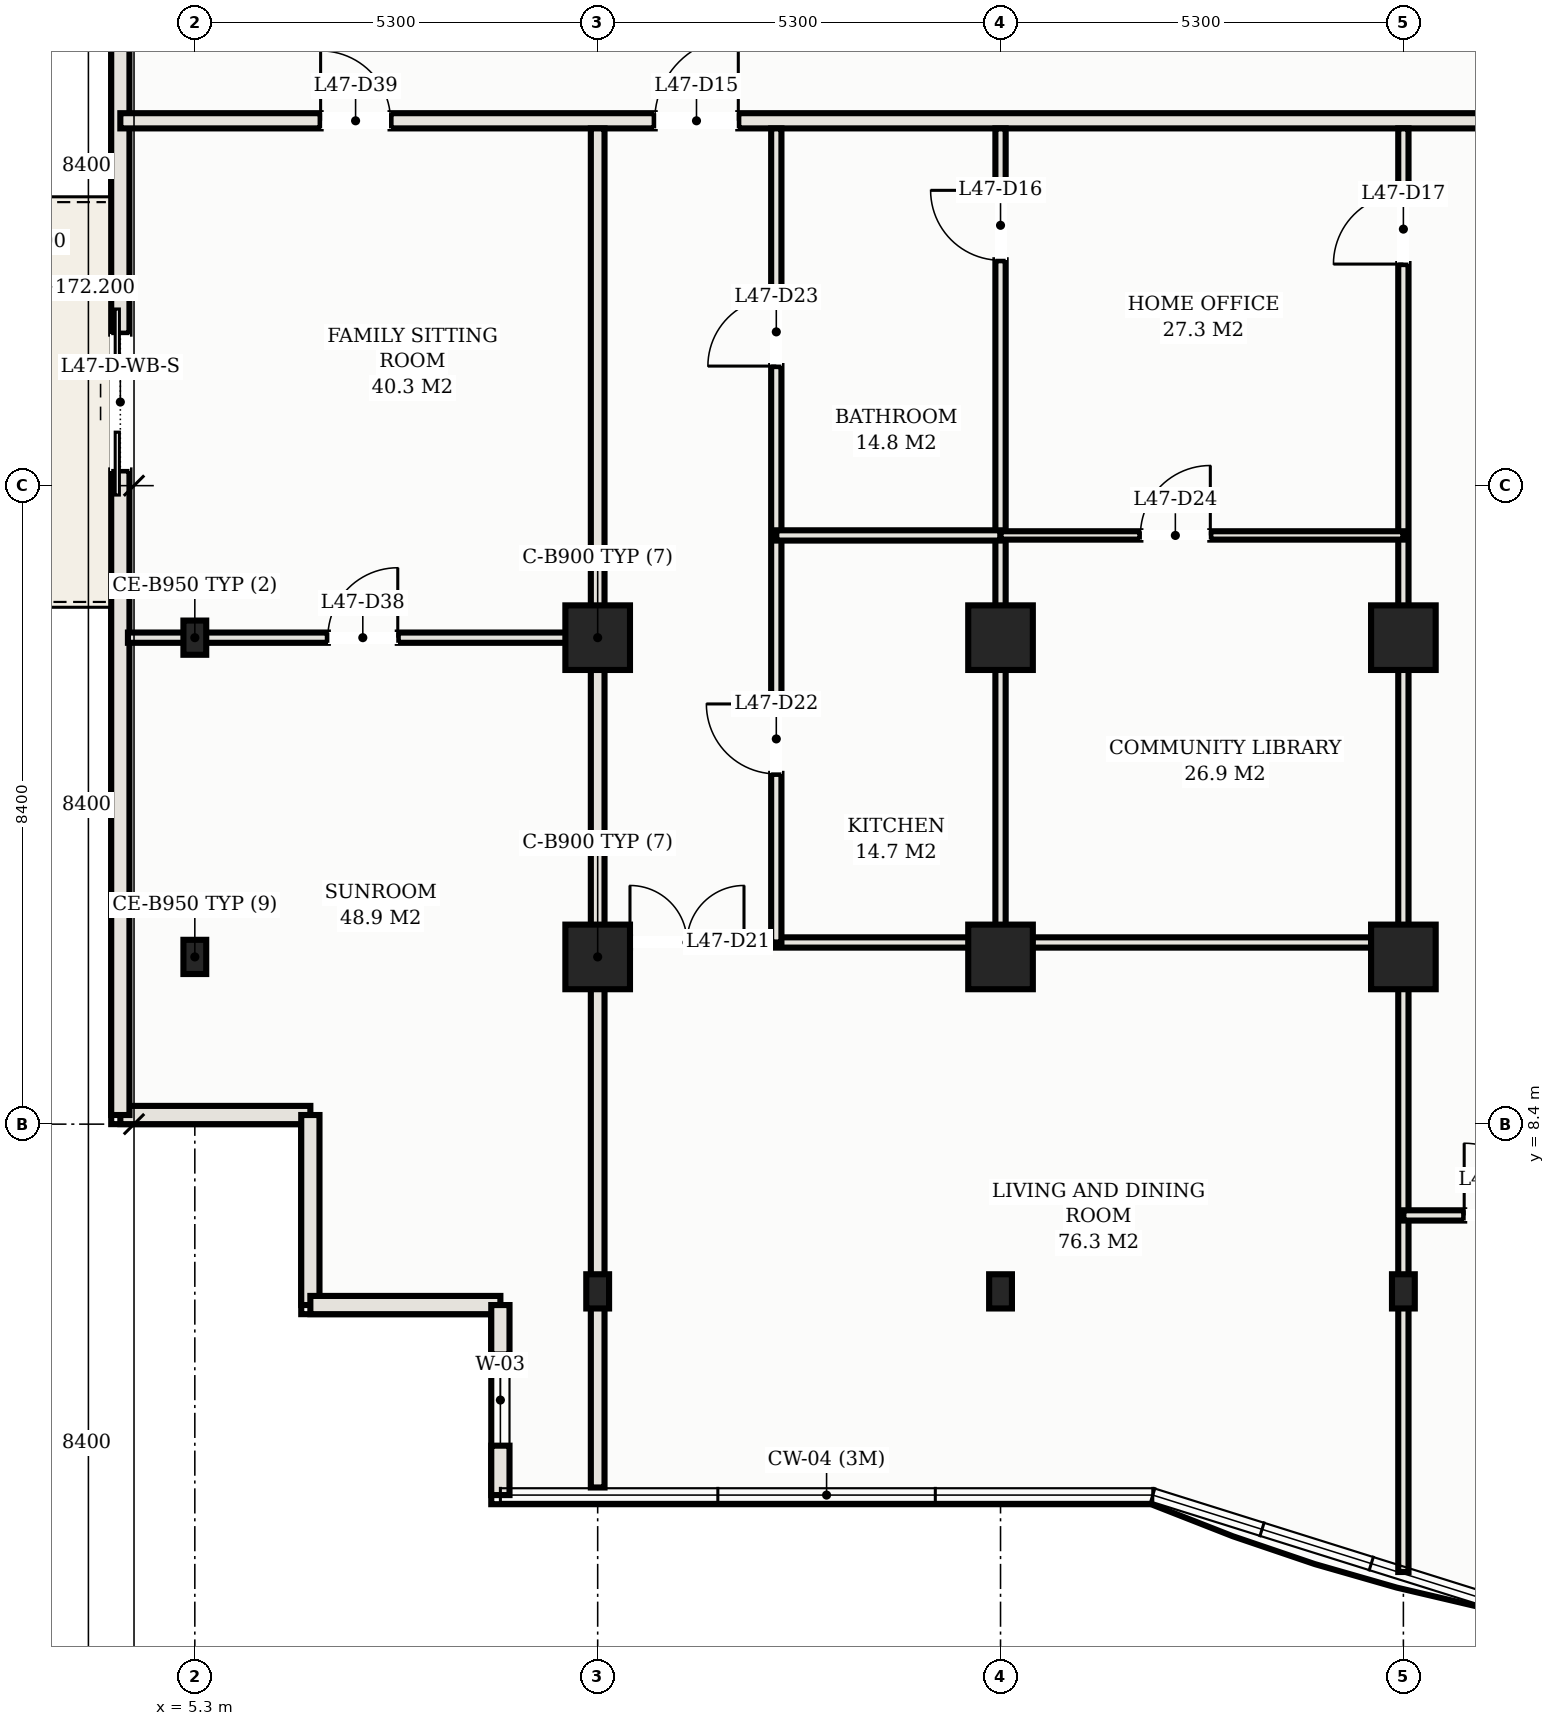
"""IFC4 building model, lengths in metres.
Left out: names, types, materials, properties, quantities, classifications, styles, units other than length and angle.
Written with IfcOpenShell. Run it as: python <this file> out.ifc"""

import sys

from ifc_helpers import new_model, si_unit, direction, frame, frame_2d, origin, origin_2d, place, context, subcontext, project, spatial, rectangle, hollow_rectangle, extrude, element, fill, save


model = new_model("IFC4")
c1 = context("Model", 3, precision=1e-05, world=origin(), true_north=direction((0.0, 1.0)))
c2 = subcontext(c1, "Body", "Model", "MODEL_VIEW")
j1 = project(units=[si_unit("LENGTHUNIT", "METRE"), si_unit("PLANEANGLEUNIT", "RADIAN")], contexts=[c1])
p1 = place(None, origin())
s1 = spatial("IfcSite", under=j1, at=p1, CompositionType="ELEMENT")
p2 = place(p1, origin())
s2 = spatial("IfcBuilding", under=s1, at=p2, CompositionType="ELEMENT")
p3 = place(p2, frame((0.0, 0.0, 172.2)))
s3 = spatial("IfcBuildingStorey", under=s2, at=p3, CompositionType="ELEMENT", Elevation=172.2)
for number, where, z_axis, x_axis in (
    (1, (10.6, 14.8, 0.0), (0.0, 0.0, 1.0), (1.0, 0.0, 0.0)),
    (2, (10.6, 10.6, 0.0), (0.0, 0.0, 1.0), (1.0, 0.0, 0.0)),
    (3, (15.9, 14.8, 0.0), (0.0, 0.0, 1.0), (1.0, 0.0, 0.0)),
    (4, (15.9, 10.6, 0.0), (0.0, 0.0, 1.0), (1.0, 0.0, 0.0)),
    (5, (21.2, 14.8, 0.0), (0.0, 0.0, 1.0), (1.0, 0.0, 0.0)),
    (6, (21.2, 10.6, 0.0), (0.0, 0.0, 1.0), (1.0, 0.0, 0.0)),
):
    element("IfcColumn", number, at=place(p3, frame(where, z_axis=z_axis, x_axis=x_axis)), inside=s3, PredefinedType="COLUMN", context=c2, shape_type="SweptSolid", body=[
        extrude(hollow_rectangle(XDim=0.85, YDim=0.85, WallThickness=0.028, at=origin_2d()), origin(), (0.0, 0.0, 1.0), 3.3),
    ])
for number, where, z_axis, x_axis in (
    (7, (10.6, 6.2, 0.0), (0.0, 0.0, 1.0), (1.0, 0.0, 0.0)),
    (8, (15.9, 6.2, 0.0), (0.0, 0.0, 1.0), (1.0, 0.0, 0.0)),
    (9, (21.2, 6.2, 0.0), (0.0, 0.0, 1.0), (1.0, 0.0, 0.0)),
    (10, (5.3, 10.6, 0.0), (0.0, 0.0, 1.0), (1.0, 0.0, 0.0)),
    (11, (5.3, 14.8, 0.0), (0.0, 0.0, 1.0), (1.0, 0.0, 0.0)),
):
    element("IfcColumn", number, at=place(p3, frame(where, z_axis=z_axis, x_axis=x_axis)), inside=s3, PredefinedType="COLUMN", context=c2, shape_type="SweptSolid", body=[
        extrude(hollow_rectangle(XDim=0.3, YDim=0.45, WallThickness=0.016, at=origin_2d()), origin(), (0.0, 0.0, 1.0), 3.3),
    ])
for number, where, z_axis, x_axis in (
    (12, (4.32, 8.52, 0.0), (0.0, 0.0, 1.0), (1.0, 0.0, 0.0)),
    (13, (6.82, 8.52, 0.0), (0.0, 0.0, 1.0), (0.0, -1.0, 0.0)),
    (14, (6.82, 6.02, 0.0), (0.0, 0.0, 1.0), (1.0, 0.0, 0.0)),
):
    element("IfcWall", number, at=place(p3, frame(where, z_axis=z_axis, x_axis=x_axis)), inside=s3, PredefinedType="SOLIDWALL", context=c2, shape_type="SweptSolid", body=[
        extrude(rectangle(XDim=2.5, YDim=0.24, at=frame_2d((1.25, 0.0))), origin(), (0.0, 0.0, 1.0), 3.1),
    ])
p4 = place(p3, frame((9.32, 6.02, 0.0), z_axis=(0.0, 0.0, 1.0), x_axis=(0.0, -1.0, 0.0)))
e15 = element("IfcWall", 15, at=p4, inside=s3, PredefinedType="SOLIDWALL", context=c2, shape_type="SweptSolid", body=[
    extrude(rectangle(XDim=2.5, YDim=0.24, at=frame_2d((1.25, 0.0))), origin(), (0.0, 0.0, 1.0), 3.1),
])
p5 = place(p4, frame((0.65, 0.0, 0.75)))
e16 = element("IfcOpeningElement", 16, at=p5, cuts=e15, PredefinedType="OPENING", context=c2, shape_type="SweptSolid", body=[
    extrude(rectangle(XDim=1.2, YDim=1.5, at=frame_2d((0.6, 0.75))), frame((0.0, 0.13, 0.0), z_axis=(0.0, -1.0, 0.0), x_axis=(1.0, 0.0, 0.0)), (0.0, 0.0, 1.0), 0.26),
])
p6 = place(p3, frame((4.32, 35.93, 0.0), z_axis=(0.0, 0.0, 1.0), x_axis=(0.0, -1.0, 0.0)))
e17 = element("IfcWall", 17, at=p6, inside=s3, PredefinedType="SOLIDWALL", context=c2, shape_type="SweptSolid", body=[
    extrude(rectangle(XDim=27.41, YDim=0.24, at=frame_2d((13.705, 0.0))), origin(), (0.0, 0.0, 1.0), 3.1),
])
p7 = place(p6, frame((17.13, 0.0, 0.0)))
e18 = element("IfcOpeningElement", 18, at=p7, cuts=e17, PredefinedType="OPENING", context=c2, shape_type="SweptSolid", body=[
    extrude(rectangle(XDim=1.8, YDim=2.2, at=frame_2d((0.9, 1.1))), frame((0.0, 0.13, 0.0), z_axis=(0.0, -1.0, 0.0), x_axis=(1.0, 0.0, 0.0)), (0.0, 0.0, 1.0), 0.26),
])
p8 = place(p3, frame((4.32, 21.6, 0.0), z_axis=(0.0, 0.0, 1.0), x_axis=(1.0, 0.0, 0.0)))
e19 = element("IfcWall", 19, at=p8, inside=s3, PredefinedType="PARTITIONING", context=c2, shape_type="SweptSolid", body=[
    extrude(rectangle(XDim=44.36, YDim=0.2, at=frame_2d((22.18, 0.0))), origin(), (0.0, 0.0, 1.0), 2.38),
])
p9 = place(p8, frame((7.03, 0.0, 0.0)))
e20 = element("IfcOpeningElement", 20, at=p9, cuts=e19, PredefinedType="OPENING", context=c2, shape_type="SweptSolid", body=[
    extrude(rectangle(XDim=1.1, YDim=2.25, at=frame_2d((0.55, 1.125))), frame((0.0, 0.11, 0.0), z_axis=(0.0, -1.0, 0.0), x_axis=(1.0, 0.0, 0.0)), (0.0, 0.0, 1.0), 0.22),
])
p10 = place(p8, frame((2.635, 0.0, 0.0)))
e21 = element("IfcOpeningElement", 21, at=p10, cuts=e19, PredefinedType="OPENING", context=c2, shape_type="SweptSolid", body=[
    extrude(rectangle(XDim=0.92, YDim=2.15, at=frame_2d((0.46, 1.075))), frame((0.0, 0.11, 0.0), z_axis=(0.0, -1.0, 0.0), x_axis=(1.0, 0.0, 0.0)), (0.0, 0.0, 1.0), 0.22),
])
p11 = place(p8, frame((40.805, 0.0, 0.0)))
e22 = element("IfcOpeningElement", 22, at=p11, cuts=e19, PredefinedType="OPENING", context=c2, shape_type="SweptSolid", body=[
    extrude(rectangle(XDim=0.92, YDim=2.15, at=frame_2d((0.46, 1.075))), frame((0.0, 0.11, 0.0), z_axis=(0.0, -1.0, 0.0), x_axis=(1.0, 0.0, 0.0)), (0.0, 0.0, 1.0), 0.22),
])
p12 = place(p3, frame((10.6, 3.62, 0.0), z_axis=(0.0, 0.0, 1.0), x_axis=(0.0, 1.0, 0.0)))
e23 = element("IfcWall", 23, at=p12, inside=s3, PredefinedType="PARTITIONING", context=c2, shape_type="SweptSolid", body=[
    extrude(rectangle(XDim=17.88, YDim=0.18, at=frame_2d((8.94, 0.0))), origin(), (0.0, 0.0, 1.0), 2.38),
])
p13 = place(p3, frame((15.9, 14.8, 0.0), z_axis=(0.0, 0.0, 1.0), x_axis=(0.0, 1.0, 0.0)))
e24 = element("IfcWall", 24, at=p13, inside=s3, PredefinedType="PARTITIONING", context=c2, shape_type="SweptSolid", body=[
    extrude(rectangle(XDim=6.7, YDim=0.135, at=frame_2d((3.35, 0.0))), origin(), (0.0, 0.0, 1.0), 2.38),
])
p14 = place(p13, frame((4.965, 0.0, 0.0)))
e25 = element("IfcOpeningElement", 25, at=p14, cuts=e24, PredefinedType="OPENING", context=c2, shape_type="SweptSolid", body=[
    extrude(rectangle(XDim=0.92, YDim=2.15, at=frame_2d((0.46, 1.075))), frame((0.0, 0.078, 0.0), z_axis=(0.0, -1.0, 0.0), x_axis=(1.0, 0.0, 0.0)), (0.0, 0.0, 1.0), 0.155),
])
p15 = place(p3, frame((21.2, 2.508, 0.0), z_axis=(0.0, 0.0, 1.0), x_axis=(0.0, 1.0, 0.0)))
e26 = element("IfcWall", 26, at=p15, inside=s3, PredefinedType="PARTITIONING", context=c2, shape_type="SweptSolid", body=[
    extrude(rectangle(XDim=18.992, YDim=0.135, at=frame_2d((9.496, 0.0))), origin(), (0.0, 0.0, 1.0), 2.38),
])
p16 = place(p15, frame((17.207, 0.0, 0.0)))
e27 = element("IfcOpeningElement", 27, at=p16, cuts=e26, PredefinedType="OPENING", context=c2, shape_type="SweptSolid", body=[
    extrude(rectangle(XDim=0.92, YDim=2.15, at=frame_2d((0.46, 1.075))), frame((0.0, 0.078, 0.0), z_axis=(0.0, -1.0, 0.0), x_axis=(1.0, 0.0, 0.0)), (0.0, 0.0, 1.0), 0.155),
])
p17 = place(p3, frame((15.9, 10.79, 0.0), z_axis=(0.0, 0.0, 1.0), x_axis=(0.0, 1.0, 0.0)))
e28 = element("IfcWall", 28, at=p17, inside=s3, PredefinedType="PARTITIONING", context=c2, shape_type="SweptSolid", body=[
    extrude(rectangle(XDim=4.01, YDim=0.135, at=frame_2d((2.005, 0.0))), origin(), (0.0, 0.0, 1.0), 2.38),
])
p18 = place(p3, frame((10.6, 10.79, 0.0), z_axis=(0.0, 0.0, 1.0), x_axis=(1.0, 0.0, 0.0)))
e29 = element("IfcWall", 29, at=p18, inside=s3, PredefinedType="PARTITIONING", context=c2, shape_type="SweptSolid", body=[
    extrude(rectangle(XDim=10.6, YDim=0.135, at=frame_2d((5.3, 0.0))), origin(), (0.0, 0.0, 1.0), 2.38),
])
p19 = place(p18, frame((0.425, 0.0, 0.0)))
e30 = element("IfcOpeningElement", 30, at=p19, cuts=e29, PredefinedType="OPENING", context=c2, shape_type="SweptSolid", body=[
    extrude(rectangle(XDim=1.5, YDim=2.25, at=frame_2d((0.75, 1.125))), frame((0.0, 0.078, 0.0), z_axis=(0.0, -1.0, 0.0), x_axis=(1.0, 0.0, 0.0)), (0.0, 0.0, 1.0), 0.155),
])
p20 = place(p3, frame((12.95, 10.79, 0.0), z_axis=(0.0, 0.0, 1.0), x_axis=(0.0, 1.0, 0.0)))
e31 = element("IfcWall", 31, at=p20, inside=s3, PredefinedType="PARTITIONING", context=c2, shape_type="SweptSolid", body=[
    extrude(rectangle(XDim=10.71, YDim=0.135, at=frame_2d((5.355, 0.0))), origin(), (0.0, 0.0, 1.0), 2.38),
])
p21 = place(p20, frame((2.218, 0.0, 0.0)))
e32 = element("IfcOpeningElement", 32, at=p21, cuts=e31, PredefinedType="OPENING", context=c2, shape_type="SweptSolid", body=[
    extrude(rectangle(XDim=0.92, YDim=2.15, at=frame_2d((0.46, 1.075))), frame((0.0, 0.078, 0.0), z_axis=(0.0, -1.0, 0.0), x_axis=(1.0, 0.0, 0.0)), (0.0, 0.0, 1.0), 0.155),
])
p22 = place(p20, frame((7.583, 0.0, 0.0)))
e33 = element("IfcOpeningElement", 33, at=p22, cuts=e31, PredefinedType="OPENING", context=c2, shape_type="SweptSolid", body=[
    extrude(rectangle(XDim=0.9, YDim=2.15, at=frame_2d((0.45, 1.075))), frame((0.0, 0.078, 0.0), z_axis=(0.0, -1.0, 0.0), x_axis=(1.0, 0.0, 0.0)), (0.0, 0.0, 1.0), 0.155),
])
p23 = place(p3, frame((12.95, 16.145, 0.0), z_axis=(0.0, 0.0, 1.0), x_axis=(1.0, 0.0, 0.0)))
e34 = element("IfcWall", 34, at=p23, inside=s3, PredefinedType="PARTITIONING", context=c2, shape_type="SweptSolid", body=[
    extrude(rectangle(XDim=2.95, YDim=0.135, at=frame_2d((1.475, 0.0))), origin(), (0.0, 0.0, 1.0), 2.38),
])
p24 = place(p3, frame((15.9, 16.145, 0.0), z_axis=(0.0, 0.0, 1.0), x_axis=(1.0, 0.0, 0.0)))
e35 = element("IfcWall", 35, at=p24, inside=s3, PredefinedType="MOVABLE", context=c2, shape_type="SweptSolid", body=[
    extrude(rectangle(XDim=5.3, YDim=0.11, at=frame_2d((2.65, 0.0))), origin(), (0.0, 0.0, 1.0), 2.38),
])
p25 = place(p24, frame((1.84, 0.0, 0.0)))
e36 = element("IfcOpeningElement", 36, at=p25, cuts=e35, PredefinedType="OPENING", context=c2, shape_type="SweptSolid", body=[
    extrude(rectangle(XDim=0.92, YDim=2.15, at=frame_2d((0.46, 1.075))), frame((0.0, 0.065, 0.0), z_axis=(0.0, -1.0, 0.0), x_axis=(1.0, 0.0, 0.0)), (0.0, 0.0, 1.0), 0.13),
])
p26 = place(p3, frame((21.2, 7.199, 0.0), z_axis=(0.0, 0.0, 1.0), x_axis=(1.0, 0.0, 0.0)))
e37 = element("IfcWall", 37, at=p26, inside=s3, PredefinedType="PARTITIONING", context=c2, shape_type="SweptSolid", body=[
    extrude(rectangle(XDim=5.3, YDim=0.135, at=frame_2d((2.65, 0.0))), origin(), (0.0, 0.0, 1.0), 2.38),
])
p27 = place(p26, frame((0.8, 0.0, 0.0)))
e38 = element("IfcOpeningElement", 38, at=p27, cuts=e37, PredefinedType="OPENING", context=c2, shape_type="SweptSolid", body=[
    extrude(rectangle(XDim=0.95, YDim=2.15, at=frame_2d((0.475, 1.075))), frame((0.0, 0.078, 0.0), z_axis=(0.0, -1.0, 0.0), x_axis=(1.0, 0.0, 0.0)), (0.0, 0.0, 1.0), 0.155),
])
p28 = place(p26, frame((3.075, 0.0, 0.0)))
e39 = element("IfcOpeningElement", 39, at=p28, cuts=e37, PredefinedType="OPENING", context=c2, shape_type="SweptSolid", body=[
    extrude(rectangle(XDim=0.9, YDim=2.15, at=frame_2d((0.45, 1.075))), frame((0.0, 0.078, 0.0), z_axis=(0.0, -1.0, 0.0), x_axis=(1.0, 0.0, 0.0)), (0.0, 0.0, 1.0), 0.155),
])
p29 = place(p3, frame((4.42, 14.8, 0.0), z_axis=(0.0, 0.0, 1.0), x_axis=(1.0, 0.0, 0.0)))
e40 = element("IfcWall", 40, at=p29, inside=s3, PredefinedType="PARTITIONING", context=c2, shape_type="SweptSolid", body=[
    extrude(rectangle(XDim=6.18, YDim=0.135, at=frame_2d((3.09, 0.0))), origin(), (0.0, 0.0, 1.0), 2.38),
])
p30 = place(p29, frame((2.63, 0.0, 0.0)))
e41 = element("IfcOpeningElement", 41, at=p30, cuts=e40, PredefinedType="OPENING", context=c2, shape_type="SweptSolid", body=[
    extrude(rectangle(XDim=0.92, YDim=2.15, at=frame_2d((0.46, 1.075))), frame((0.0, 0.078, 0.0), z_axis=(0.0, -1.0, 0.0), x_axis=(1.0, 0.0, 0.0)), (0.0, 0.0, 1.0), 0.155),
])
p31 = place(p5, origin())
e42 = element("IfcWindow", 42, at=p31, inside=s3, PartitioningType="SINGLE_PANEL", PredefinedType="WINDOW", context=c2, shape_type="SweptSolid", body=[
    extrude(rectangle(XDim=1.2, YDim=1.5, at=frame_2d((0.6, 0.75))), frame((0.0, 0.03, 0.0), z_axis=(0.0, -1.0, 0.0), x_axis=(1.0, 0.0, 0.0)), (0.0, 0.0, 1.0), 0.06),
])
fill(e16, e42)
p32 = place(p7, frame((1.8, 0.0, 0.0), z_axis=(0.0, 0.0, 1.0), x_axis=(-1.0, 0.0, 0.0)))
e43 = element("IfcDoor", 43, at=p32, inside=s3, OperationType="DOUBLE_DOOR_SLIDING", PredefinedType="DOOR", context=c2, shape_type="SweptSolid", body=[
    extrude(rectangle(XDim=1.8, YDim=2.2, at=frame_2d((0.9, 1.1))), frame((0.0, 0.025, 0.0), z_axis=(0.0, -1.0, 0.0), x_axis=(1.0, 0.0, 0.0)), (0.0, 0.0, 1.0), 0.05),
])
fill(e18, e43)
p33 = place(p9, origin())
e44 = element("IfcDoor", 44, at=p33, inside=s3, OperationType="SINGLE_SWING_RIGHT", PredefinedType="DOOR", context=c2, shape_type="SweptSolid", body=[
    extrude(rectangle(XDim=1.1, YDim=2.25, at=frame_2d((0.55, 1.125))), frame((0.0, 0.025, 0.0), z_axis=(0.0, -1.0, 0.0), x_axis=(1.0, 0.0, 0.0)), (0.0, 0.0, 1.0), 0.05),
])
fill(e20, e44)
p34 = place(p14, origin())
e45 = element("IfcDoor", 45, at=p34, inside=s3, OperationType="SINGLE_SWING_RIGHT", PredefinedType="DOOR", context=c2, shape_type="SweptSolid", body=[
    extrude(rectangle(XDim=0.92, YDim=2.15, at=frame_2d((0.46, 1.075))), frame((0.0, 0.025, 0.0), z_axis=(0.0, -1.0, 0.0), x_axis=(1.0, 0.0, 0.0)), (0.0, 0.0, 1.0), 0.05),
])
fill(e25, e45)
p35 = place(p16, origin())
e46 = element("IfcDoor", 46, at=p35, inside=s3, OperationType="SINGLE_SWING_LEFT", PredefinedType="DOOR", context=c2, shape_type="SweptSolid", body=[
    extrude(rectangle(XDim=0.92, YDim=2.15, at=frame_2d((0.46, 1.075))), frame((0.0, 0.025, 0.0), z_axis=(0.0, -1.0, 0.0), x_axis=(1.0, 0.0, 0.0)), (0.0, 0.0, 1.0), 0.05),
])
fill(e27, e46)
p36 = place(p19, origin())
e47 = element("IfcDoor", 47, at=p36, inside=s3, OperationType="DOUBLE_DOOR_SINGLE_SWING", PredefinedType="DOOR", context=c2, shape_type="SweptSolid", body=[
    extrude(rectangle(XDim=1.5, YDim=2.25, at=frame_2d((0.75, 1.125))), frame((0.0, 0.025, 0.0), z_axis=(0.0, -1.0, 0.0), x_axis=(1.0, 0.0, 0.0)), (0.0, 0.0, 1.0), 0.05),
])
fill(e30, e47)
p37 = place(p21, origin())
e48 = element("IfcDoor", 48, at=p37, inside=s3, OperationType="SINGLE_SWING_RIGHT", PredefinedType="DOOR", context=c2, shape_type="SweptSolid", body=[
    extrude(rectangle(XDim=0.92, YDim=2.15, at=frame_2d((0.46, 1.075))), frame((0.0, 0.025, 0.0), z_axis=(0.0, -1.0, 0.0), x_axis=(1.0, 0.0, 0.0)), (0.0, 0.0, 1.0), 0.05),
])
fill(e32, e48)
p38 = place(p22, origin())
e49 = element("IfcDoor", 49, at=p38, inside=s3, OperationType="SINGLE_SWING_LEFT", PredefinedType="DOOR", context=c2, shape_type="SweptSolid", body=[
    extrude(rectangle(XDim=0.9, YDim=2.15, at=frame_2d((0.45, 1.075))), frame((0.0, 0.025, 0.0), z_axis=(0.0, -1.0, 0.0), x_axis=(1.0, 0.0, 0.0)), (0.0, 0.0, 1.0), 0.05),
])
fill(e33, e49)
p39 = place(p25, origin())
e50 = element("IfcDoor", 50, at=p39, inside=s3, OperationType="SINGLE_SWING_RIGHT", PredefinedType="DOOR", context=c2, shape_type="SweptSolid", body=[
    extrude(rectangle(XDim=0.92, YDim=2.15, at=frame_2d((0.46, 1.075))), frame((0.0, 0.025, 0.0), z_axis=(0.0, -1.0, 0.0), x_axis=(1.0, 0.0, 0.0)), (0.0, 0.0, 1.0), 0.05),
])
fill(e36, e50)
p40 = place(p27, origin())
e51 = element("IfcDoor", 51, at=p40, inside=s3, OperationType="SINGLE_SWING_LEFT", PredefinedType="DOOR", context=c2, shape_type="SweptSolid", body=[
    extrude(rectangle(XDim=0.95, YDim=2.15, at=frame_2d((0.475, 1.075))), frame((0.0, 0.025, 0.0), z_axis=(0.0, -1.0, 0.0), x_axis=(1.0, 0.0, 0.0)), (0.0, 0.0, 1.0), 0.05),
])
fill(e38, e51)
p41 = place(p30, origin())
e52 = element("IfcDoor", 52, at=p41, inside=s3, OperationType="SINGLE_SWING_RIGHT", PredefinedType="DOOR", context=c2, shape_type="SweptSolid", body=[
    extrude(rectangle(XDim=0.92, YDim=2.15, at=frame_2d((0.46, 1.075))), frame((0.0, 0.025, 0.0), z_axis=(0.0, -1.0, 0.0), x_axis=(1.0, 0.0, 0.0)), (0.0, 0.0, 1.0), 0.05),
])
fill(e41, e52)
p42 = place(p10, origin())
e53 = element("IfcDoor", 53, at=p42, inside=s3, OperationType="SINGLE_SWING_LEFT", PredefinedType="DOOR", context=c2, shape_type="SweptSolid", body=[
    extrude(rectangle(XDim=0.92, YDim=2.15, at=frame_2d((0.46, 1.075))), frame((0.0, 0.025, 0.0), z_axis=(0.0, -1.0, 0.0), x_axis=(1.0, 0.0, 0.0)), (0.0, 0.0, 1.0), 0.05),
])
fill(e21, e53)
save(model, sys.argv[1])
